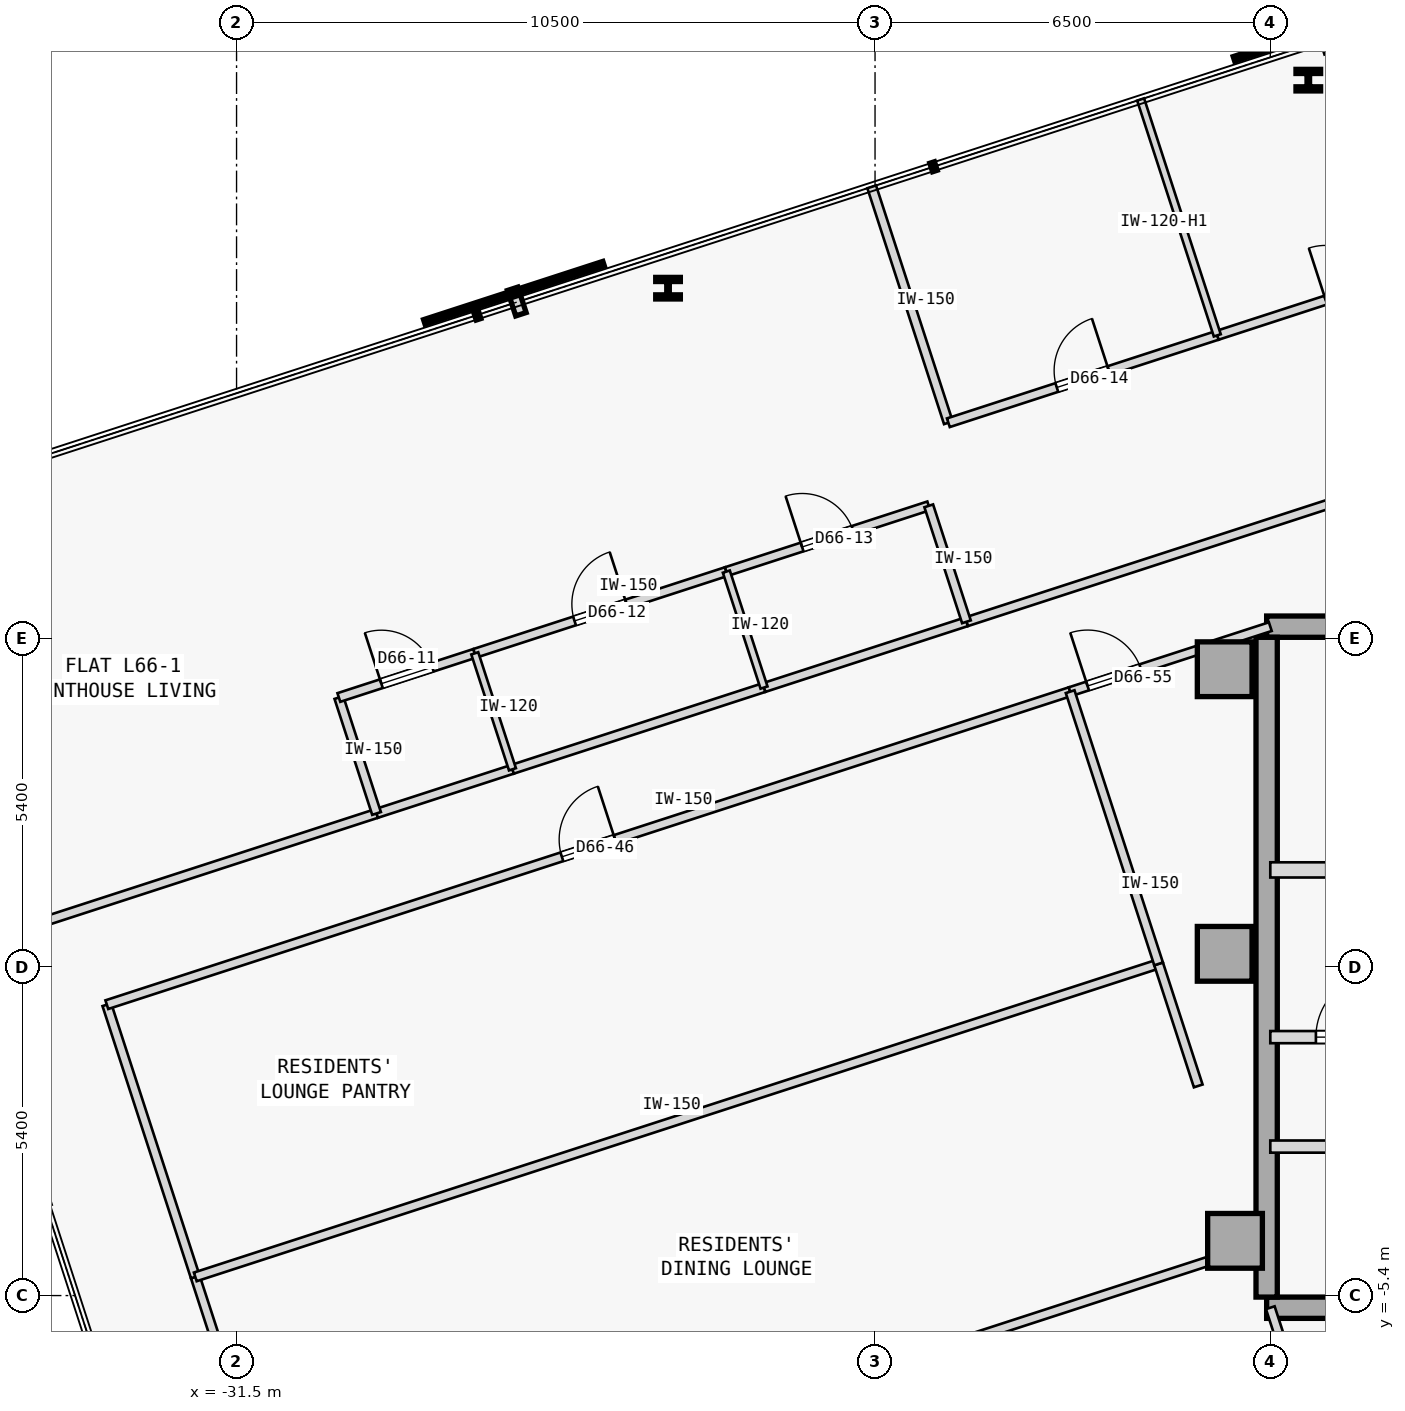
"""IFC4 building model, lengths in metres.
Left out: names, types, materials, properties, quantities, classifications, styles, units other than length and angle.
Written with IfcOpenShell. Run it as: python <this file> out.ifc"""

import sys

from ifc_helpers import new_model, si_unit, direction, frame, frame_2d, origin, origin_2d, place, context, subcontext, project, spatial, rectangle, i_section, extrude, element, fill, save


model = new_model("IFC4")
c1 = context("Model", 3, precision=1e-05, world=origin(), true_north=direction((0.0, 1.0)))
c2 = subcontext(c1, "Body", "Model", "MODEL_VIEW")
j1 = project(units=[si_unit("LENGTHUNIT", "METRE"), si_unit("PLANEANGLEUNIT", "RADIAN")], contexts=[c1])
p1 = place(None, origin())
s1 = spatial("IfcSite", under=j1, at=p1, CompositionType="ELEMENT")
p2 = place(p1, origin())
s2 = spatial("IfcBuilding", under=s1, at=p2, CompositionType="ELEMENT")
p3 = place(p2, frame((0.0, 0.0, 247.75)))
s3 = spatial("IfcBuildingStorey", under=s2, at=p3, CompositionType="ELEMENT", Elevation=247.75)
for number, where, z_axis, x_axis in (
    (1, (-15.25, 4.9, 0.0), (0.0, 0.0, 1.0), (1.0, 0.0, 0.0)),
    (2, (-15.25, 0.22, 0.0), (0.0, 0.0, 1.0), (1.0, 0.0, 0.0)),
    (3, (-15.08, -4.5, 0.0), (0.0, 0.0, 1.0), (1.0, 0.0, 0.0)),
):
    element("IfcColumn", number, at=place(p3, frame(where, z_axis=z_axis, x_axis=x_axis)), inside=s3, PredefinedType="COLUMN", context=c2, shape_type="SweptSolid", body=[
        extrude(rectangle(XDim=0.9, YDim=0.9, at=origin_2d()), origin(), (0.0, 0.0, 1.0), 3.35),
    ])
p4 = place(p3, frame((-14.56, 5.6, 0.0), z_axis=(0.0, 0.0, 1.0), x_axis=(1.0, 0.0, 0.0)))
e4 = element("IfcWall", 4, at=p4, inside=s3, PredefinedType="SHEAR", context=c2, shape_type="SweptSolid", body=[
    extrude(rectangle(XDim=11.41, YDim=0.35, at=frame_2d((5.705, 0.0))), origin(), (0.0, 0.0, 1.0), 3.125),
])
p5 = place(p3, frame((-14.56, -5.6, 0.0), z_axis=(0.0, 0.0, 1.0), x_axis=(1.0, 0.0, 0.0)))
e5 = element("IfcWall", 5, at=p5, inside=s3, PredefinedType="SHEAR", context=c2, shape_type="SweptSolid", body=[
    extrude(rectangle(XDim=10.86, YDim=0.35, at=frame_2d((5.43, 0.0))), origin(), (0.0, 0.0, 1.0), 3.125),
])
p6 = place(p3, frame((-14.56, -5.425, 0.0), z_axis=(0.0, 0.0, 1.0), x_axis=(0.0, 1.0, 0.0)))
e6 = element("IfcWall", 6, at=p6, inside=s3, PredefinedType="SHEAR", context=c2, shape_type="SweptSolid", body=[
    extrude(rectangle(XDim=10.85, YDim=0.35, at=frame_2d((5.425, 0.0))), origin(), (0.0, 0.0, 1.0), 3.125),
])
for number, where, z_axis, x_axis in (
    (7, (-13.875, 14.587, 0.0), (0.0, 0.0, 1.0), (1.0, 0.0, 0.0)),
    (8, (-24.404, 11.166, 0.0), (0.0, 0.0, 1.0), (1.0, 0.0, 0.0)),
):
    element("IfcColumn", number, at=place(p3, frame(where, z_axis=z_axis, x_axis=x_axis)), inside=s3, PredefinedType="COLUMN", context=c2, shape_type="SweptSolid", body=[
        extrude(i_section(OverallWidth=0.405, OverallDepth=0.355, WebThickness=0.042, FlangeThickness=0.068, FilletRadius=0.015, at=origin_2d()), origin(), (0.0, 0.0, 1.0), 3.35),
    ])
p7 = place(p3, frame((-14.5, 1.6, 0.0), z_axis=(0.0, 0.0, 1.0), x_axis=(1.0, 0.0, 0.0)))
e9 = element("IfcWall", 9, at=p7, inside=s3, PredefinedType="STANDARD", context=c2, shape_type="SweptSolid", body=[
    extrude(rectangle(XDim=3.6, YDim=0.25, at=frame_2d((1.8, 0.0))), origin(), (0.0, 0.0, 1.0), 3.125),
])
p8 = place(p7, frame((0.92, 0.0, 0.0)))
e10 = element("IfcOpeningElement", 10, at=p8, cuts=e9, PredefinedType="OPENING", context=c2, shape_type="SweptSolid", body=[
    extrude(rectangle(XDim=1.05, YDim=2.15, at=frame_2d((0.525, 1.075))), frame((0.0, 0.135, 0.0), z_axis=(0.0, -1.0, 0.0), x_axis=(1.0, 0.0, 0.0)), (0.0, 0.0, 1.0), 0.27),
])
p9 = place(p3, frame((-14.5, -1.15, 0.0), z_axis=(0.0, 0.0, 1.0), x_axis=(1.0, 0.0, 0.0)))
e11 = element("IfcWall", 11, at=p9, inside=s3, PredefinedType="STANDARD", context=c2, shape_type="SweptSolid", body=[
    extrude(rectangle(XDim=2.95, YDim=0.2, at=frame_2d((1.475, 0.0))), origin(), (0.0, 0.0, 1.0), 3.125),
])
p10 = place(p9, frame((0.75, 0.0, 0.0)))
e12 = element("IfcOpeningElement", 12, at=p10, cuts=e11, PredefinedType="OPENING", context=c2, shape_type="SweptSolid", body=[
    extrude(rectangle(XDim=1.05, YDim=2.18, at=frame_2d((0.525, 1.09))), frame((0.0, 0.11, 0.0), z_axis=(0.0, -1.0, 0.0), x_axis=(1.0, 0.0, 0.0)), (0.0, 0.0, 1.0), 0.22),
])
p11 = place(p3, frame((-14.5, -2.95, 0.0), z_axis=(0.0, 0.0, 1.0), x_axis=(1.0, 0.0, 0.0)))
e13 = element("IfcWall", 13, at=p11, inside=s3, PredefinedType="STANDARD", context=c2, shape_type="SweptSolid", body=[
    extrude(rectangle(XDim=10.8, YDim=0.2, at=frame_2d((5.4, 0.0))), origin(), (0.0, 0.0, 1.0), 3.125),
])
p12 = place(p11, frame((9.17, 0.0, 0.0)))
e14 = element("IfcOpeningElement", 14, at=p12, cuts=e13, PredefinedType="OPENING", context=c2, shape_type="SweptSolid", body=[
    extrude(rectangle(XDim=1.1, YDim=2.15, at=frame_2d((0.55, 1.075))), frame((0.0, 0.11, 0.0), z_axis=(0.0, -1.0, 0.0), x_axis=(1.0, 0.0, 0.0)), (0.0, 0.0, 1.0), 0.22),
])
p13 = place(p11, frame((1.73, 0.0, 0.0)))
e15 = element("IfcOpeningElement", 15, at=p13, cuts=e13, PredefinedType="OPENING", context=c2, shape_type="SweptSolid", body=[
    extrude(rectangle(XDim=0.92, YDim=2.15, at=frame_2d((0.46, 1.075))), frame((0.0, 0.11, 0.0), z_axis=(0.0, -1.0, 0.0), x_axis=(1.0, 0.0, 0.0)), (0.0, 0.0, 1.0), 0.22),
])
p14 = place(p11, frame((6.05, 0.0, 0.0)))
e16 = element("IfcOpeningElement", 16, at=p14, cuts=e13, PredefinedType="OPENING", context=c2, shape_type="SweptSolid", body=[
    extrude(rectangle(XDim=0.92, YDim=2.15, at=frame_2d((0.46, 1.075))), frame((0.0, 0.11, 0.0), z_axis=(0.0, -1.0, 0.0), x_axis=(1.0, 0.0, 0.0)), (0.0, 0.0, 1.0), 0.22),
])
p15 = place(p3, frame((-36.012, 0.314, 0.0), z_axis=(0.0, 0.0, 1.0), x_axis=(0.951054850325, 0.309022121658, 0.0)))
e17 = element("IfcWall", 17, at=p15, inside=s3, PredefinedType="PARTITIONING", context=c2, shape_type="SweptSolid", body=[
    extrude(rectangle(XDim=7.165, YDim=0.15, at=frame_2d((3.583, 0.0))), origin(), (0.0, 0.0, 1.0), 3.125),
])
p16 = place(p3, frame((-19.497, 5.68, 0.0), z_axis=(0.0, 0.0, 1.0), x_axis=(0.95105300492, 0.309027801067, 0.0)))
e18 = element("IfcWall", 18, at=p16, inside=s3, PredefinedType="PARTITIONING", context=c2, shape_type="SweptSolid", body=[
    extrude(rectangle(XDim=14.779, YDim=0.15, at=frame_2d((7.39, 0.0))), origin(), (0.0, 0.0, 1.0), 3.125),
])
p17 = place(p16, frame((6.915, 0.0, 0.0)))
e19 = element("IfcOpeningElement", 19, at=p17, cuts=e18, PredefinedType="OPENING", context=c2, shape_type="SweptSolid", body=[
    extrude(rectangle(XDim=0.95, YDim=2.15, at=frame_2d((0.475, 1.075))), frame((0.0, 0.085, 0.0), z_axis=(0.0, -1.0, 0.0), x_axis=(1.0, 0.0, 0.0)), (0.0, 0.0, 1.0), 0.17),
])
p18 = place(p3, frame((-29.198, 2.528, 0.0), z_axis=(0.0, 0.0, 1.0), x_axis=(0.951076048914, 0.308956872689, 0.0)))
e20 = element("IfcWall", 20, at=p18, inside=s3, PredefinedType="PARTITIONING", context=c2, shape_type="SweptSolid", body=[
    extrude(rectangle(XDim=2.35, YDim=0.15, at=frame_2d((1.175, 0.0))), origin(), (0.0, 0.0, 1.0), 3.125),
])
p19 = place(p3, frame((-26.963, 3.254, 0.0), z_axis=(0.0, 0.0, 1.0), x_axis=(0.951057987102, 0.309012467661, 0.0)))
e21 = element("IfcWall", 21, at=p19, inside=s3, PredefinedType="PARTITIONING", context=c2, shape_type="SweptSolid", body=[
    extrude(rectangle(XDim=4.35, YDim=0.15, at=frame_2d((2.175, 0.0))), origin(), (0.0, 0.0, 1.0), 3.125),
])
p20 = place(p3, frame((-22.826, 4.599, 0.0), z_axis=(0.0, 0.0, 1.0), x_axis=(0.951055596592, 0.309019824916, 0.0)))
e22 = element("IfcWall", 22, at=p20, inside=s3, PredefinedType="PARTITIONING", context=c2, shape_type="SweptSolid", body=[
    extrude(rectangle(XDim=3.5, YDim=0.15, at=frame_2d((1.75, 0.0))), origin(), (0.0, 0.0, 1.0), 3.125),
])
p21 = place(p3, frame((-30.663, -9.757, 0.0), z_axis=(0.0, 0.0, 1.0), x_axis=(-0.309019653166, 0.951055652397, 0.0)))
e23 = element("IfcWall", 23, at=p21, inside=s3, PredefinedType="PARTITIONING", context=c2, shape_type="SweptSolid", body=[
    extrude(rectangle(XDim=4.904, YDim=0.15, at=frame_2d((2.452, 0.0))), origin(), (0.0, 0.0, 1.0), 3.125),
])
p22 = place(p21, frame((1.992, 0.0, 0.0)))
e24 = element("IfcOpeningElement", 24, at=p22, cuts=e23, PredefinedType="OPENING", context=c2, shape_type="SweptSolid", body=[
    extrude(rectangle(XDim=0.92, YDim=2.15, at=frame_2d((0.46, 1.075))), frame((0.0, 0.085, 0.0), z_axis=(0.0, -1.0, 0.0), x_axis=(1.0, 0.0, 0.0)), (0.0, 0.0, 1.0), 0.17),
])
p23 = place(p3, frame((-32.179, -5.093, 0.0), z_axis=(0.0, 0.0, 1.0), x_axis=(-0.309014532869, 0.951057316083, 0.0)))
e25 = element("IfcWall", 25, at=p23, inside=s3, PredefinedType="PARTITIONING", context=c2, shape_type="SweptSolid", body=[
    extrude(rectangle(XDim=4.707, YDim=0.15, at=frame_2d((2.354, 0.0))), origin(), (0.0, 0.0, 1.0), 3.125),
])
p24 = place(p3, frame((-33.633, -0.616, 0.0), z_axis=(0.0, 0.0, 1.0), x_axis=(0.951058192995, 0.309011833974, 0.0)))
e26 = element("IfcWall", 26, at=p24, inside=s3, PredefinedType="PARTITIONING", context=c2, shape_type="SweptSolid", body=[
    extrude(rectangle(XDim=16.657, YDim=0.15, at=frame_2d((8.329, 0.0))), origin(), (0.0, 0.0, 1.0), 3.125),
])
p25 = place(p24, frame((7.868, 0.0, 0.0)))
e27 = element("IfcOpeningElement", 27, at=p25, cuts=e26, PredefinedType="OPENING", context=c2, shape_type="SweptSolid", body=[
    extrude(rectangle(XDim=0.92, YDim=2.15, at=frame_2d((0.46, 1.075))), frame((0.0, 0.085, 0.0), z_axis=(0.0, -1.0, 0.0), x_axis=(1.0, 0.0, 0.0)), (0.0, 0.0, 1.0), 0.17),
])
p26 = place(p3, frame((-17.792, 4.531, 0.0), z_axis=(0.0, 0.0, 1.0), x_axis=(0.951047546178, 0.309044600193, 0.0)))
e28 = element("IfcWall", 28, at=p26, inside=s3, PredefinedType="PARTITIONING", context=c2, shape_type="SweptSolid", body=[
    extrude(rectangle(XDim=3.461, YDim=0.15, at=frame_2d((1.73, 0.0))), origin(), (0.0, 0.0, 1.0), 3.125),
])
p27 = place(p26, frame((0.302, 0.0, 0.0)))
e29 = element("IfcOpeningElement", 29, at=p27, cuts=e28, PredefinedType="OPENING", context=c2, shape_type="SweptSolid", body=[
    extrude(rectangle(XDim=0.92, YDim=2.15, at=frame_2d((0.46, 1.075))), frame((0.0, 0.085, 0.0), z_axis=(0.0, -1.0, 0.0), x_axis=(1.0, 0.0, 0.0)), (0.0, 0.0, 1.0), 0.17),
])
p28 = place(p3, frame((-29.198, 2.528, 0.0), z_axis=(0.0, 0.0, 1.0), x_axis=(-0.308948390121, 0.951078804433, 0.0)))
e30 = element("IfcWall", 30, at=p28, inside=s3, PredefinedType="PARTITIONING", context=c2, shape_type="SweptSolid", body=[
    extrude(rectangle(XDim=2.005, YDim=0.15, at=frame_2d((1.002, 0.0))), origin(), (0.0, 0.0, 1.0), 3.125),
])
p29 = place(p3, frame((-29.817, 4.435, 0.0), z_axis=(0.0, 0.0, 1.0), x_axis=(0.951035595692, 0.309081373955, 0.0)))
e31 = element("IfcWall", 31, at=p29, inside=s3, PredefinedType="PARTITIONING", context=c2, shape_type="SweptSolid", body=[
    extrude(rectangle(XDim=2.35, YDim=0.15, at=frame_2d((1.175, 0.0))), origin(), (0.0, 0.0, 1.0), 3.125),
])
p30 = place(p29, frame((0.735, 0.0, 0.0)))
e32 = element("IfcOpeningElement", 32, at=p30, cuts=e31, PredefinedType="OPENING", context=c2, shape_type="SweptSolid", body=[
    extrude(rectangle(XDim=0.88, YDim=2.15, at=frame_2d((0.44, 1.075))), frame((0.0, 0.085, 0.0), z_axis=(0.0, -1.0, 0.0), x_axis=(1.0, 0.0, 0.0)), (0.0, 0.0, 1.0), 0.17),
])
p31 = place(p3, frame((-27.583, 5.161, 0.0), z_axis=(0.0, 0.0, 1.0), x_axis=(0.951057987102, 0.309012467661, 0.0)))
e33 = element("IfcWall", 33, at=p31, inside=s3, PredefinedType="PARTITIONING", context=c2, shape_type="SweptSolid", body=[
    extrude(rectangle(XDim=4.35, YDim=0.15, at=frame_2d((2.175, 0.0))), origin(), (0.0, 0.0, 1.0), 3.125),
])
p32 = place(p31, frame((1.725, 0.0, 0.0)))
e34 = element("IfcOpeningElement", 34, at=p32, cuts=e33, PredefinedType="OPENING", context=c2, shape_type="SweptSolid", body=[
    extrude(rectangle(XDim=0.9, YDim=2.15, at=frame_2d((0.45, 1.075))), frame((0.0, 0.085, 0.0), z_axis=(0.0, -1.0, 0.0), x_axis=(1.0, 0.0, 0.0)), (0.0, 0.0, 1.0), 0.17),
])
p33 = place(p3, frame((-23.445, 6.506, 0.0), z_axis=(0.0, 0.0, 1.0), x_axis=(0.951055596592, 0.309019824916, 0.0)))
e35 = element("IfcWall", 35, at=p33, inside=s3, PredefinedType="PARTITIONING", context=c2, shape_type="SweptSolid", body=[
    extrude(rectangle(XDim=3.5, YDim=0.15, at=frame_2d((1.75, 0.0))), origin(), (0.0, 0.0, 1.0), 3.125),
])
p34 = place(p33, frame((1.31, 0.0, 0.0)))
e36 = element("IfcOpeningElement", 36, at=p34, cuts=e35, PredefinedType="OPENING", context=c2, shape_type="SweptSolid", body=[
    extrude(rectangle(XDim=0.88, YDim=2.15, at=frame_2d((0.44, 1.075))), frame((0.0, 0.085, 0.0), z_axis=(0.0, -1.0, 0.0), x_axis=(1.0, 0.0, 0.0)), (0.0, 0.0, 1.0), 0.17),
])
p35 = place(p3, frame((-19.497, 5.68, 0.0), z_axis=(0.0, 0.0, 1.0), x_axis=(-0.309022749039, 0.951054646472, 0.0)))
e37 = element("IfcWall", 37, at=p35, inside=s3, PredefinedType="PARTITIONING", context=c2, shape_type="SweptSolid", body=[
    extrude(rectangle(XDim=2.005, YDim=0.15, at=frame_2d((1.002, 0.0))), origin(), (0.0, 0.0, 1.0), 3.125),
])
p36 = place(p3, frame((-19.794, 8.954, 0.0), z_axis=(0.0, 0.0, 1.0), x_axis=(-0.309018403393, 0.951056058476, 0.0)))
e38 = element("IfcWall", 38, at=p36, inside=s3, PredefinedType="PARTITIONING", context=c2, shape_type="SweptSolid", body=[
    extrude(rectangle(XDim=4.079, YDim=0.15, at=frame_2d((2.04, 0.0))), origin(), (0.0, 0.0, 1.0), 3.125),
])
p37 = place(p3, frame((-19.794, 8.954, 0.0), z_axis=(0.0, 0.0, 1.0), x_axis=(0.951065702951, 0.308988719326, 0.0)))
e39 = element("IfcWall", 39, at=p37, inside=s3, PredefinedType="PARTITIONING", context=c2, shape_type="SweptSolid", body=[
    extrude(rectangle(XDim=4.65, YDim=0.15, at=frame_2d((2.325, 0.0))), origin(), (0.0, 0.0, 1.0), 3.125),
])
p38 = place(p37, frame((1.875, 0.0, 0.0)))
e40 = element("IfcOpeningElement", 40, at=p38, cuts=e39, PredefinedType="OPENING", context=c2, shape_type="SweptSolid", body=[
    extrude(rectangle(XDim=0.9, YDim=2.15, at=frame_2d((0.45, 1.075))), frame((0.0, 0.085, 0.0), z_axis=(0.0, -1.0, 0.0), x_axis=(1.0, 0.0, 0.0)), (0.0, 0.0, 1.0), 0.17),
])
p39 = place(p3, frame((-15.372, 10.39, 0.0), z_axis=(0.0, 0.0, 1.0), x_axis=(0.951050272606, 0.309036209813, 0.0)))
e41 = element("IfcWall", 41, at=p39, inside=s3, PredefinedType="PARTITIONING", context=c2, shape_type="SweptSolid", body=[
    extrude(rectangle(XDim=4.65, YDim=0.15, at=frame_2d((2.325, 0.0))), origin(), (0.0, 0.0, 1.0), 3.125),
])
p40 = place(p39, frame((1.875, 0.0, 0.0)))
e42 = element("IfcOpeningElement", 42, at=p40, cuts=e41, PredefinedType="OPENING", context=c2, shape_type="SweptSolid", body=[
    extrude(rectangle(XDim=0.9, YDim=2.15, at=frame_2d((0.45, 1.075))), frame((0.0, 0.085, 0.0), z_axis=(0.0, -1.0, 0.0), x_axis=(1.0, 0.0, 0.0)), (0.0, 0.0, 1.0), 0.17),
])
for number, where, z_axis, x_axis in (
    (43, (-26.963, 3.254, 0.0), (0.0, 0.0, 1.0), (-0.309, 0.951, 0.0)),
    (44, (-22.826, 4.599, 0.0), (0.0, 0.0, 1.0), (-0.309, 0.951, 0.0)),
):
    element("IfcWall", number, at=place(p3, frame(where, z_axis=z_axis, x_axis=x_axis)), inside=s3, PredefinedType="PARTITIONING", context=c2, shape_type="SweptSolid", body=[
        extrude(rectangle(XDim=2.005, YDim=0.12, at=frame_2d((1.002, 0.0))), origin(), (0.0, 0.0, 1.0), 3.125),
    ])
p41 = place(p3, frame((-15.372, 10.39, 0.0), z_axis=(0.0, 0.0, 1.0), x_axis=(-0.309000814064, 0.951061773445, 0.0)))
e45 = element("IfcWall", 45, at=p41, inside=s3, PredefinedType="PARTITIONING", context=c2, shape_type="SweptSolid", body=[
    extrude(rectangle(XDim=4.079, YDim=0.12, at=frame_2d((2.04, 0.0))), origin(), (0.0, 0.0, 1.0), 2.675),
])
p42 = place(p3, frame((-30.663, -9.757, 0.0), z_axis=(0.0, 0.0, 1.0), x_axis=(0.951058192995, 0.309011833974, 0.0)))
e46 = element("IfcWall", 46, at=p42, inside=s3, PredefinedType="PARTITIONING", context=c2, shape_type="SweptSolid", body=[
    extrude(rectangle(XDim=16.657, YDim=0.15, at=frame_2d((8.329, 0.0))), origin(), (0.0, 0.0, 1.0), 3.125),
])
p43 = place(p3, frame((-13.488, -8.713, 0.0), z_axis=(0.0, 0.0, 1.0), x_axis=(-0.309082700143, 0.951035164687, 0.0)))
e47 = element("IfcWall", 47, at=p43, inside=s3, PredefinedType="PARTITIONING", context=c2, shape_type="SweptSolid", body=[
    extrude(rectangle(XDim=3.274, YDim=0.15, at=frame_2d((1.637, 0.0))), origin(), (0.0, 0.0, 1.0), 3.125),
])
p44 = place(p3, frame((-32.179, -5.093, 0.0), z_axis=(0.0, 0.0, 1.0), x_axis=(0.951053885426, 0.309025091239, 0.0)))
e48 = element("IfcWall", 48, at=p44, inside=s3, PredefinedType="PARTITIONING", context=c2, shape_type="SweptSolid", body=[
    extrude(rectangle(XDim=16.657, YDim=0.15, at=frame_2d((8.329, 0.0))), origin(), (0.0, 0.0, 1.0), 3.125),
])
p45 = place(p3, frame((-15.685, -1.952, 0.0), z_axis=(0.0, 0.0, 1.0), x_axis=(-0.308929092959, 0.951085072706, 0.0)))
e49 = element("IfcWall", 49, at=p45, inside=s3, PredefinedType="PARTITIONING", context=c2, shape_type="SweptSolid", body=[
    extrude(rectangle(XDim=2.11, YDim=0.15, at=frame_2d((1.055, 0.0))), origin(), (0.0, 0.0, 1.0), 3.125),
])
p46 = place(p3, frame((-16.337, 0.054, 0.0), z_axis=(0.0, 0.0, 1.0), x_axis=(-0.309029776355, 0.951052363083, 0.0)))
e50 = element("IfcWall", 50, at=p46, inside=s3, PredefinedType="PARTITIONING", context=c2, shape_type="SweptSolid", body=[
    extrude(rectangle(XDim=4.707, YDim=0.15, at=frame_2d((2.354, 0.0))), origin(), (0.0, 0.0, 1.0), 3.125),
])
p47 = place(p10, origin())
e51 = element("IfcDoor", 51, at=p47, inside=s3, OperationType="SINGLE_SWING_RIGHT", PredefinedType="DOOR", context=c2, shape_type="SweptSolid", body=[
    extrude(rectangle(XDim=1.05, YDim=2.18, at=frame_2d((0.525, 1.09))), frame((0.0, 0.025, 0.0), z_axis=(0.0, -1.0, 0.0), x_axis=(1.0, 0.0, 0.0)), (0.0, 0.0, 1.0), 0.05),
])
fill(e12, e51)
p48 = place(p30, origin())
e52 = element("IfcDoor", 52, at=p48, inside=s3, OperationType="SINGLE_SWING_LEFT", PredefinedType="DOOR", context=c2, shape_type="SweptSolid", body=[
    extrude(rectangle(XDim=0.88, YDim=2.15, at=frame_2d((0.44, 1.075))), frame((0.0, 0.025, 0.0), z_axis=(0.0, -1.0, 0.0), x_axis=(1.0, 0.0, 0.0)), (0.0, 0.0, 1.0), 0.05),
])
fill(e32, e52)
p49 = place(p32, origin())
e53 = element("IfcDoor", 53, at=p49, inside=s3, OperationType="SINGLE_SWING_RIGHT", PredefinedType="DOOR", context=c2, shape_type="SweptSolid", body=[
    extrude(rectangle(XDim=0.9, YDim=2.15, at=frame_2d((0.45, 1.075))), frame((0.0, 0.025, 0.0), z_axis=(0.0, -1.0, 0.0), x_axis=(1.0, 0.0, 0.0)), (0.0, 0.0, 1.0), 0.05),
])
fill(e34, e53)
p50 = place(p34, origin())
e54 = element("IfcDoor", 54, at=p50, inside=s3, OperationType="SINGLE_SWING_LEFT", PredefinedType="DOOR", context=c2, shape_type="SweptSolid", body=[
    extrude(rectangle(XDim=0.88, YDim=2.15, at=frame_2d((0.44, 1.075))), frame((0.0, 0.025, 0.0), z_axis=(0.0, -1.0, 0.0), x_axis=(1.0, 0.0, 0.0)), (0.0, 0.0, 1.0), 0.05),
])
fill(e36, e54)
p51 = place(p38, origin())
e55 = element("IfcDoor", 55, at=p51, inside=s3, OperationType="SINGLE_SWING_RIGHT", PredefinedType="DOOR", context=c2, shape_type="SweptSolid", body=[
    extrude(rectangle(XDim=0.9, YDim=2.15, at=frame_2d((0.45, 1.075))), frame((0.0, 0.025, 0.0), z_axis=(0.0, -1.0, 0.0), x_axis=(1.0, 0.0, 0.0)), (0.0, 0.0, 1.0), 0.05),
])
fill(e40, e55)
p52 = place(p40, origin())
e56 = element("IfcDoor", 56, at=p52, inside=s3, OperationType="SINGLE_SWING_LEFT", PredefinedType="DOOR", context=c2, shape_type="SweptSolid", body=[
    extrude(rectangle(XDim=0.9, YDim=2.15, at=frame_2d((0.45, 1.075))), frame((0.0, 0.025, 0.0), z_axis=(0.0, -1.0, 0.0), x_axis=(1.0, 0.0, 0.0)), (0.0, 0.0, 1.0), 0.05),
])
fill(e42, e56)
p53 = place(p25, origin())
e57 = element("IfcDoor", 57, at=p53, inside=s3, OperationType="SINGLE_SWING_RIGHT", PredefinedType="DOOR", context=c2, shape_type="SweptSolid", body=[
    extrude(rectangle(XDim=0.92, YDim=2.15, at=frame_2d((0.46, 1.075))), frame((0.0, 0.025, 0.0), z_axis=(0.0, -1.0, 0.0), x_axis=(1.0, 0.0, 0.0)), (0.0, 0.0, 1.0), 0.05),
])
fill(e27, e57)
p54 = place(p27, origin())
e58 = element("IfcDoor", 58, at=p54, inside=s3, OperationType="SINGLE_SWING_LEFT", PredefinedType="DOOR", context=c2, shape_type="SweptSolid", body=[
    extrude(rectangle(XDim=0.92, YDim=2.15, at=frame_2d((0.46, 1.075))), frame((0.0, 0.025, 0.0), z_axis=(0.0, -1.0, 0.0), x_axis=(1.0, 0.0, 0.0)), (0.0, 0.0, 1.0), 0.05),
])
fill(e29, e58)
save(model, sys.argv[1])
